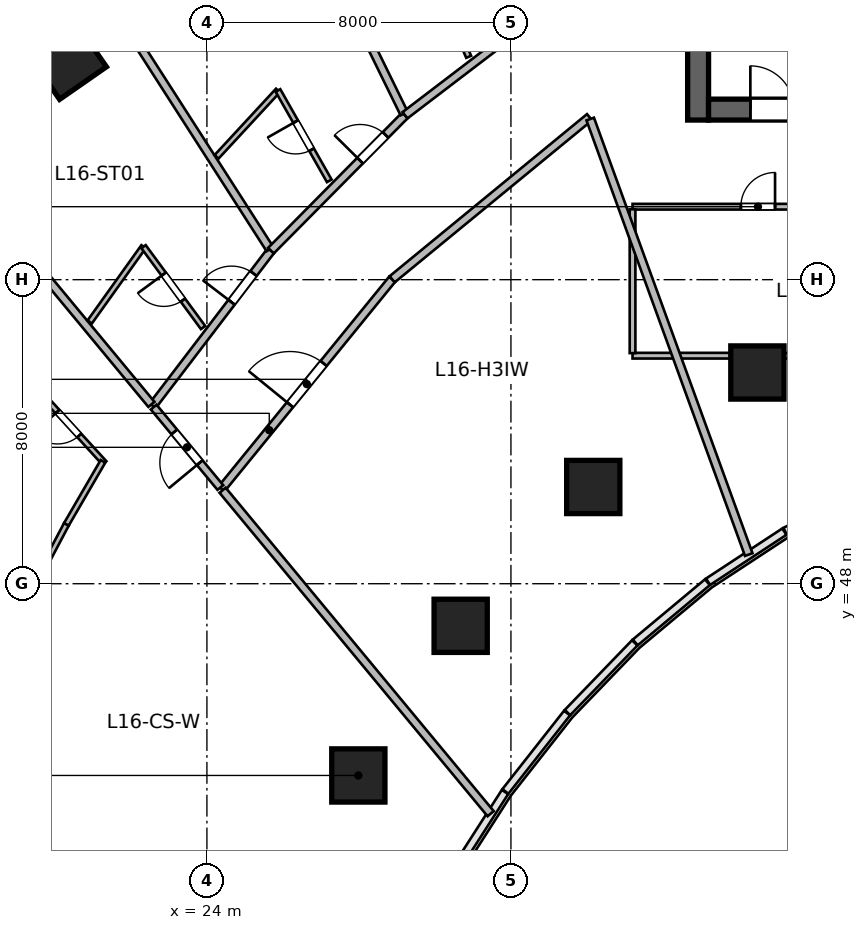
"""IFC4 building model, lengths in metres.
Left out: names, types, materials, properties, quantities, classifications, styles, units other than length and angle.
Written with IfcOpenShell. Run it as: python <this file> out.ifc"""

import sys

from ifc_helpers import new_model, si_unit, direction, frame, frame_2d, origin, origin_2d, place, context, subcontext, project, spatial, rectangle, circle, extrude, source, transform, mapped, element, fill, save


model = new_model("IFC4")
c1 = context("Model", 3, precision=1e-05, world=origin(), true_north=direction((0.0, 1.0)))
c2 = subcontext(c1, "Body", "Model", "MODEL_VIEW")
j1 = project(units=[si_unit("LENGTHUNIT", "METRE"), si_unit("PLANEANGLEUNIT", "RADIAN")], contexts=[c1])
p1 = place(None, origin())
s1 = spatial("IfcSite", under=j1, at=p1, CompositionType="ELEMENT")
p2 = place(p1, origin())
s2 = spatial("IfcBuilding", under=s1, at=p2, CompositionType="ELEMENT")
p3 = place(p2, frame((0.0, 0.0, 71.4)))
s3 = spatial("IfcBuildingStorey", under=s2, at=p3, CompositionType="ELEMENT", Elevation=71.4)
m1 = source(origin(), c2, "Body", "SweptSolid", [
    extrude(rectangle(XDim=12.0, YDim=0.55, at=frame_2d((6.0, 0.0))), origin(), (0.0, 0.0, 1.0), 3.6),
])
p4 = place(p3, frame((36.925, 60.2, 0.0), z_axis=(0.0, 0.0, 1.0), x_axis=(0.0, 1.0, 0.0)))
e1 = element("IfcWall", 1, at=p4, inside=s3, PredefinedType="SHEAR", context=c2, shape_type="MappedRepresentation", body=[
    mapped(m1, transform((0.0, 0.0, 0.0), scale=1.0)),
])
m2 = source(origin(), c2, "Body", "SweptSolid", [
    extrude(rectangle(XDim=21.6, YDim=0.55, at=frame_2d((10.8, 0.0))), origin(), (0.0, 0.0, 1.0), 3.6),
])
p5 = place(p3, frame((37.2, 60.475, 0.0), z_axis=(0.0, 0.0, 1.0), x_axis=(1.0, 0.0, 0.0)))
e2 = element("IfcWall", 2, at=p5, inside=s3, PredefinedType="SHEAR", context=c2, shape_type="MappedRepresentation", body=[
    mapped(m2, transform((0.0, 0.0, 0.0), scale=1.0)),
])
p6 = place(p5, frame((1.1, 0.0, 0.0)))
e3 = element("IfcOpeningElement", 3, at=p6, cuts=e2, PredefinedType="OPENING", context=c2, shape_type="SweptSolid", body=[
    extrude(rectangle(XDim=1.15, YDim=2.15, at=frame_2d((0.575, 1.075))), frame((0.0, 0.285, 0.0), z_axis=(0.0, -1.0, 0.0), x_axis=(1.0, 0.0, 0.0)), (0.0, 0.0, 1.0), 0.57),
])
p7 = place(p5, frame((19.5, 0.0, 0.0)))
e4 = element("IfcOpeningElement", 4, at=p7, cuts=e2, PredefinedType="OPENING", context=c2, shape_type="SweptSolid", body=[
    extrude(rectangle(XDim=0.9, YDim=2.1, at=frame_2d((0.45, 1.05))), frame((0.0, 0.285, 0.0), z_axis=(0.0, -1.0, 0.0), x_axis=(1.0, 0.0, 0.0)), (0.0, 0.0, 1.0), 0.57),
])
p8 = place(p5, frame((12.02, 0.0, 0.0)))
e5 = element("IfcOpeningElement", 5, at=p8, cuts=e2, PredefinedType="OPENING", context=c2, shape_type="SweptSolid", body=[
    extrude(rectangle(XDim=1.6, YDim=2.15, at=frame_2d((0.8, 1.075))), frame((0.0, 0.285, 0.0), z_axis=(0.0, -1.0, 0.0), x_axis=(1.0, 0.0, 0.0)), (0.0, 0.0, 1.0), 0.57),
])
m3 = source(origin(), c2, "Body", "SweptSolid", [
    extrude(circle(Radius=0.7, at=origin_2d()), origin(), (0.0, 0.0, 1.0), 3.6),
])
for number, where, z_axis, x_axis in (
    (6, (27.985, 42.955, 0.0), (0.0, 0.0, 1.0), (-0.691, 0.723, 0.0)),
    (7, (30.677, 46.892, 0.0), (0.0, 0.0, 1.0), (-0.571, 0.821, 0.0)),
):
    element("IfcColumn", number, at=place(p3, frame(where, z_axis=z_axis, x_axis=x_axis)), inside=s3, PredefinedType="COLUMN", context=c2, shape_type="MappedRepresentation", body=[
        mapped(m3, transform((0.0, 0.0, 0.0), scale=1.0)),
    ])
m4 = source(origin(), c2, "Body", "SweptSolid", [
    extrude(rectangle(XDim=1.5, YDim=1.5, at=origin_2d()), origin(), (0.0, 0.0, 1.0), 3.6),
])
p9 = place(p3, frame((20.311, 61.789, 0.0), z_axis=(0.0, 0.0, 1.0), x_axis=(-0.571143442153, 0.820850271661, 0.0)))
e8 = element("IfcColumn", 8, at=p9, inside=s3, PredefinedType="COLUMN", context=c2, shape_type="MappedRepresentation", body=[
    mapped(m4, transform((0.0, 0.0, 0.0), scale=1.0)),
])
for number, where, z_axis, x_axis in (
    (9, (34.166, 50.545, 0.0), (0.0, 0.0, 1.0), (-0.436, 0.9, 0.0)),
    (10, (38.485, 53.558, 0.0), (0.0, 0.0, 1.0), (-0.289, 0.957, 0.0)),
):
    element("IfcColumn", number, at=place(p3, frame(where, z_axis=z_axis, x_axis=x_axis)), inside=s3, PredefinedType="COLUMN", context=c2, shape_type="MappedRepresentation", body=[
        mapped(m3, transform((0.0, 0.0, 0.0), scale=1.0)),
    ])
m5 = source(origin(), c2, "Body", "SweptSolid", [
    extrude(rectangle(XDim=6.6, YDim=0.15, at=frame_2d((3.3, 0.0))), origin(), (0.0, 0.0, 1.0), 2.803),
])
p10 = place(p3, frame((35.2, 54.0, 0.0), z_axis=(0.0, 0.0, 1.0), x_axis=(1.0, 0.0, 0.0)))
e11 = element("IfcWall", 11, at=p10, inside=s3, PredefinedType="PARTITIONING", context=c2, shape_type="MappedRepresentation", body=[
    mapped(m5, transform((0.0, 0.0, 0.0), scale=1.0)),
])
m6 = source(origin(), c2, "Body", "SweptSolid", [
    extrude(rectangle(XDim=6.6, YDim=0.15, at=frame_2d((3.3, 0.0))), origin(), (0.0, 0.0, 1.0), 3.36),
])
p11 = place(p3, frame((35.2, 57.92, 0.0), z_axis=(0.0, 0.0, 1.0), x_axis=(1.0, 0.0, 0.0)))
e12 = element("IfcWall", 12, at=p11, inside=s3, PredefinedType="PARTITIONING", context=c2, shape_type="MappedRepresentation", body=[
    mapped(m6, transform((0.0, 0.0, 0.0), scale=1.0)),
])
p12 = place(p11, frame((2.85, 0.0, 0.0)))
e13 = element("IfcOpeningElement", 13, at=p12, cuts=e12, PredefinedType="OPENING", context=c2, shape_type="SweptSolid", body=[
    extrude(rectangle(XDim=0.9, YDim=2.1, at=frame_2d((0.45, 1.05))), frame((0.0, 0.085, 0.0), z_axis=(0.0, -1.0, 0.0), x_axis=(1.0, 0.0, 0.0)), (0.0, 0.0, 1.0), 0.17),
])
m7 = source(origin(), c2, "Body", "SweptSolid", [
    extrude(rectangle(XDim=3.785, YDim=0.15, at=frame_2d((1.893, 0.0))), origin(), (0.0, 0.0, 1.0), 3.36),
])
p13 = place(p3, frame((35.2, 54.067, 0.0), z_axis=(0.0, 0.0, 1.0), x_axis=(0.0, 1.0, 0.0)))
e14 = element("IfcWall", 14, at=p13, inside=s3, PredefinedType="PARTITIONING", context=c2, shape_type="MappedRepresentation", body=[
    mapped(m7, transform((0.0, 0.0, 0.0), scale=1.0)),
])
m8 = source(origin(), c2, "Body", "SweptSolid", [
    extrude(rectangle(XDim=7.113, YDim=0.21, at=frame_2d((3.556, 0.0))), origin(), (0.0, 0.0, 1.0), 3.36),
])
p14 = place(p3, frame((24.383, 50.495, 0.0), z_axis=(0.0, 0.0, 1.0), x_axis=(0.63149032532, 0.775383755974, 0.0)))
e15 = element("IfcWall", 15, at=p14, inside=s3, PredefinedType="PARTITIONING", context=c2, shape_type="MappedRepresentation", body=[
    mapped(m8, transform((0.0, 0.0, 0.0), scale=1.0)),
])
p15 = place(p14, frame((2.856, 0.0, 0.0)))
e16 = element("IfcOpeningElement", 16, at=p15, cuts=e15, PredefinedType="OPENING", context=c2, shape_type="SweptSolid", body=[
    extrude(rectangle(XDim=1.4, YDim=2.15, at=frame_2d((0.7, 1.075))), frame((0.0, 0.115, 0.0), z_axis=(0.0, -1.0, 0.0), x_axis=(1.0, 0.0, 0.0)), (0.0, 0.0, 1.0), 0.23),
])
m9 = source(origin(), c2, "Body", "SweptSolid", [
    extrude(rectangle(XDim=6.721, YDim=0.21, at=frame_2d((3.361, 0.0))), origin(), (0.0, 0.0, 1.0), 3.36),
])
p16 = place(p3, frame((28.874, 56.01, 0.0), z_axis=(0.0, 0.0, 1.0), x_axis=(0.772828051199, 0.63461547671, 0.0)))
e17 = element("IfcWall", 17, at=p16, inside=s3, PredefinedType="PARTITIONING", context=c2, shape_type="MappedRepresentation", body=[
    mapped(m9, transform((0.0, 0.0, 0.0), scale=1.0)),
])
m10 = source(origin(), c2, "Body", "SweptSolid", [
    extrude(rectangle(XDim=11.053, YDim=0.21, at=frame_2d((5.527, 0.0))), origin(), (0.0, 0.0, 1.0), 3.36),
])
p17 = place(p3, frame((31.466, 41.949, 0.0), z_axis=(0.0, 0.0, 1.0), x_axis=(-0.638131235571, 0.769927611005, 0.0)))
e18 = element("IfcWall", 18, at=p17, inside=s3, PredefinedType="PARTITIONING", context=c2, shape_type="MappedRepresentation", body=[
    mapped(m10, transform((0.0, 0.0, 0.0), scale=1.0)),
])
m11 = source(origin(), c2, "Body", "SweptSolid", [
    extrude(rectangle(XDim=12.196, YDim=0.21, at=frame_2d((6.098, 0.0))), origin(), (0.0, 0.0, 1.0), 3.36),
])
p18 = place(p3, frame((38.258, 48.766, 0.0), z_axis=(0.0, 0.0, 1.0), x_axis=(-0.342022711534, 0.939691686031, 0.0)))
e19 = element("IfcWall", 19, at=p18, inside=s3, PredefinedType="PARTITIONING", context=c2, shape_type="MappedRepresentation", body=[
    mapped(m11, transform((0.0, 0.0, 0.0), scale=1.0)),
])
m12 = source(origin(), c2, "Body", "SweptSolid", [
    extrude(rectangle(XDim=5.135, YDim=0.21, at=frame_2d((2.567, 0.0))), origin(), (0.0, 0.0, 1.0), 3.36),
])
p19 = place(p3, frame((22.57, 52.683, 0.0), z_axis=(0.0, 0.0, 1.0), x_axis=(0.606802199649, 0.794852873494, 0.0)))
e20 = element("IfcWall", 20, at=p19, inside=s3, PredefinedType="PARTITIONING", context=c2, shape_type="MappedRepresentation", body=[
    mapped(m12, transform((0.0, 0.0, 0.0), scale=1.0)),
])
p20 = place(p19, frame((3.427, 0.0, 0.0)))
e21 = element("IfcOpeningElement", 21, at=p20, cuts=e20, PredefinedType="OPENING", context=c2, shape_type="SweptSolid", body=[
    extrude(rectangle(XDim=0.95, YDim=2.15, at=frame_2d((0.475, 1.075))), frame((0.0, 0.115, 0.0), z_axis=(0.0, -1.0, 0.0), x_axis=(1.0, 0.0, 0.0)), (0.0, 0.0, 1.0), 0.23),
])
m13 = source(origin(), c2, "Body", "SweptSolid", [
    extrude(rectangle(XDim=10.975, YDim=0.21, at=frame_2d((5.487, 0.0))), origin(), (0.0, 0.0, 1.0), 3.36),
])
p21 = place(p3, frame((22.54, 52.719, 0.0), z_axis=(0.0, 0.0, 1.0), x_axis=(-0.638125265812, 0.769932558821, 0.0)))
e22 = element("IfcWall", 22, at=p21, inside=s3, PredefinedType="PARTITIONING", context=c2, shape_type="MappedRepresentation", body=[
    mapped(m13, transform((0.0, 0.0, 0.0), scale=1.0)),
])
m14 = source(origin(), c2, "Body", "SweptSolid", [
    extrude(rectangle(XDim=11.432, YDim=0.21, at=frame_2d((5.716, 0.0))), origin(), (0.0, 0.0, 1.0), 3.36),
])
p22 = place(p3, frame((25.659, 56.805, 0.0), z_axis=(0.0, 0.0, 1.0), x_axis=(-0.540196183124, 0.841539115988, 0.0)))
e23 = element("IfcWall", 23, at=p22, inside=s3, PredefinedType="PARTITIONING", context=c2, shape_type="MappedRepresentation", body=[
    mapped(m14, transform((0.0, 0.0, 0.0), scale=1.0)),
])
m15 = source(origin(), c2, "Body", "SweptSolid", [
    extrude(rectangle(XDim=2.437, YDim=0.14, at=frame_2d((1.218, 0.0))), origin(), (0.0, 0.0, 1.0), 3.36),
])
p23 = place(p3, frame((20.915, 54.886, 0.0), z_axis=(0.0, 0.0, 1.0), x_axis=(0.581797219134, 0.813333877204, 0.0)))
e24 = element("IfcWall", 24, at=p23, inside=s3, PredefinedType="PARTITIONING", context=c2, shape_type="MappedRepresentation", body=[
    mapped(m15, transform((0.0, 0.0, 0.0), scale=1.0)),
])
m16 = source(origin(), c2, "Body", "SweptSolid", [
    extrude(rectangle(XDim=2.642, YDim=0.14, at=frame_2d((1.321, 0.0))), origin(), (0.0, 0.0, 1.0), 3.36),
])
p24 = place(p3, frame((23.899, 54.741, 0.0), z_axis=(0.0, 0.0, 1.0), x_axis=(-0.592789122423, 0.805357719487, 0.0)))
e25 = element("IfcWall", 25, at=p24, inside=s3, PredefinedType="PARTITIONING", context=c2, shape_type="MappedRepresentation", body=[
    mapped(m16, transform((0.0, 0.0, 0.0), scale=1.0)),
])
p25 = place(p24, frame((0.896, 0.0, 0.0)))
e26 = element("IfcOpeningElement", 26, at=p25, cuts=e25, PredefinedType="OPENING", context=c2, shape_type="SweptSolid", body=[
    extrude(rectangle(XDim=0.85, YDim=2.05, at=frame_2d((0.425, 1.025))), frame((0.0, 0.08, 0.0), z_axis=(0.0, -1.0, 0.0), x_axis=(1.0, 0.0, 0.0)), (0.0, 0.0, 1.0), 0.16),
])
m17 = source(origin(), c2, "Body", "SweptSolid", [
    extrude(rectangle(XDim=5.012, YDim=0.21, at=frame_2d((2.506, 0.0))), origin(), (0.0, 0.0, 1.0), 3.36),
])
p26 = place(p3, frame((25.685, 56.764, 0.0), z_axis=(0.0, 0.0, 1.0), x_axis=(0.703664626435, 0.710532260707, 0.0)))
e27 = element("IfcWall", 27, at=p26, inside=s3, PredefinedType="PARTITIONING", context=c2, shape_type="MappedRepresentation", body=[
    mapped(m17, transform((0.0, 0.0, 0.0), scale=1.0)),
])
p27 = place(p26, frame((3.335, 0.0, 0.0)))
e28 = element("IfcOpeningElement", 28, at=p27, cuts=e27, PredefinedType="OPENING", context=c2, shape_type="SweptSolid", body=[
    extrude(rectangle(XDim=0.95, YDim=2.15, at=frame_2d((0.475, 1.075))), frame((0.0, 0.115, 0.0), z_axis=(0.0, -1.0, 0.0), x_axis=(1.0, 0.0, 0.0)), (0.0, 0.0, 1.0), 0.23),
])
m18 = source(origin(), c2, "Body", "SweptSolid", [
    extrude(rectangle(XDim=11.775, YDim=0.21, at=frame_2d((5.887, 0.0))), origin(), (0.0, 0.0, 1.0), 2.644),
])
p28 = place(p3, frame((29.19, 60.371, 0.0), z_axis=(0.0, 0.0, 1.0), x_axis=(-0.4401500056, 0.897924257702, 0.0)))
e29 = element("IfcWall", 29, at=p28, inside=s3, PredefinedType="PARTITIONING", context=c2, shape_type="MappedRepresentation", body=[
    mapped(m18, transform((0.0, 0.0, 0.0), scale=1.0)),
])
m19 = source(origin(), c2, "Body", "SweptSolid", [
    extrude(rectangle(XDim=2.38, YDim=0.14, at=frame_2d((1.19, 0.0))), origin(), (0.0, 0.0, 1.0), 3.36),
])
p29 = place(p3, frame((24.253, 59.231, 0.0), z_axis=(0.0, 0.0, 1.0), x_axis=(0.679084816758, 0.734059814762, 0.0)))
e30 = element("IfcWall", 30, at=p29, inside=s3, PredefinedType="PARTITIONING", context=c2, shape_type="MappedRepresentation", body=[
    mapped(m19, transform((0.0, 0.0, 0.0), scale=1.0)),
])
m20 = source(origin(), c2, "Body", "SweptSolid", [
    extrude(rectangle(XDim=2.735, YDim=0.14, at=frame_2d((1.367, 0.0))), origin(), (0.0, 0.0, 1.0), 3.36),
])
p30 = place(p3, frame((27.219, 58.6, 0.0), z_axis=(0.0, 0.0, 1.0), x_axis=(-0.493694940578, 0.869635156631, 0.0)))
e31 = element("IfcWall", 31, at=p30, inside=s3, PredefinedType="PARTITIONING", context=c2, shape_type="MappedRepresentation", body=[
    mapped(m20, transform((0.0, 0.0, 0.0), scale=1.0)),
])
p31 = place(p30, frame((0.942, 0.0, 0.0)))
e32 = element("IfcOpeningElement", 32, at=p31, cuts=e31, PredefinedType="OPENING", context=c2, shape_type="SweptSolid", body=[
    extrude(rectangle(XDim=0.85, YDim=2.05, at=frame_2d((0.425, 1.025))), frame((0.0, 0.08, 0.0), z_axis=(0.0, -1.0, 0.0), x_axis=(1.0, 0.0, 0.0)), (0.0, 0.0, 1.0), 0.16),
])
m21 = source(origin(), c2, "Body", "SweptSolid", [
    extrude(rectangle(XDim=4.762, YDim=0.21, at=frame_2d((2.381, 0.0))), origin(), (0.0, 0.0, 1.0), 3.36),
])
p32 = place(p3, frame((29.212, 60.326, 0.0), z_axis=(0.0, 0.0, 1.0), x_axis=(0.795070295872, 0.60651729128, 0.0)))
e33 = element("IfcWall", 33, at=p32, inside=s3, PredefinedType="PARTITIONING", context=c2, shape_type="MappedRepresentation", body=[
    mapped(m21, transform((0.0, 0.0, 0.0), scale=1.0)),
])
p33 = place(p32, frame((3.144, 0.0, 0.0)))
e34 = element("IfcOpeningElement", 34, at=p33, cuts=e33, PredefinedType="OPENING", context=c2, shape_type="SweptSolid", body=[
    extrude(rectangle(XDim=0.95, YDim=2.15, at=frame_2d((0.475, 1.075))), frame((0.0, 0.115, 0.0), z_axis=(0.0, -1.0, 0.0), x_axis=(1.0, 0.0, 0.0)), (0.0, 0.0, 1.0), 0.23),
])
m22 = source(origin(), c2, "Body", "SweptSolid", [
    extrude(rectangle(XDim=2.819, YDim=0.14, at=frame_2d((1.409, 0.0))), origin(), (0.0, 0.0, 1.0), 3.36),
])
p34 = place(p3, frame((30.888, 61.864, 0.0), z_axis=(0.0, 0.0, 1.0), x_axis=(-0.394420979357, 0.918929861874, 0.0)))
e35 = element("IfcWall", 35, at=p34, inside=s3, PredefinedType="PARTITIONING", context=c2, shape_type="MappedRepresentation", body=[
    mapped(m22, transform((0.0, 0.0, 0.0), scale=1.0)),
])
p35 = place(p34, frame((0.984, 0.0, 0.0)))
e36 = element("IfcOpeningElement", 36, at=p35, cuts=e35, PredefinedType="OPENING", context=c2, shape_type="SweptSolid", body=[
    extrude(rectangle(XDim=0.85, YDim=2.05, at=frame_2d((0.425, 1.025))), frame((0.0, 0.08, 0.0), z_axis=(0.0, -1.0, 0.0), x_axis=(1.0, 0.0, 0.0)), (0.0, 0.0, 1.0), 0.16),
])
m23 = source(origin(), c2, "Body", "SweptSolid", [
    extrude(rectangle(XDim=2.748, YDim=0.195, at=frame_2d((1.374, 0.0))), origin(), (0.0, 0.0, 1.0), 3.36),
])
p36 = place(p3, frame((24.353, 50.531, 0.0), z_axis=(0.0, 0.0, 1.0), x_axis=(-0.638111168284, 0.769944242729, 0.0)))
e37 = element("IfcWall", 37, at=p36, inside=s3, PredefinedType="PARTITIONING", context=c2, shape_type="MappedRepresentation", body=[
    mapped(m23, transform((0.0, 0.0, 0.0), scale=1.0)),
])
p37 = place(p36, frame((0.849, 0.0, 0.0)))
e38 = element("IfcOpeningElement", 38, at=p37, cuts=e37, PredefinedType="OPENING", context=c2, shape_type="SweptSolid", body=[
    extrude(rectangle(XDim=1.05, YDim=2.15, at=frame_2d((0.525, 1.075))), frame((0.0, 0.107, 0.0), z_axis=(0.0, -1.0, 0.0), x_axis=(1.0, 0.0, 0.0)), (0.0, 0.0, 1.0), 0.215),
])
m24 = source(origin(), c2, "Body", "SweptSolid", [
    extrude(rectangle(XDim=2.812, YDim=0.14, at=frame_2d((1.406, 0.0))), origin(), (0.0, 0.0, 1.0), 3.36),
])
p38 = place(p3, frame((21.303, 51.177, 0.0), z_axis=(0.0, 0.0, 1.0), x_axis=(-0.675119025852, 0.737708818527, 0.0)))
e39 = element("IfcWall", 39, at=p38, inside=s3, PredefinedType="PARTITIONING", context=c2, shape_type="MappedRepresentation", body=[
    mapped(m24, transform((0.0, 0.0, 0.0), scale=1.0)),
])
p39 = place(p38, frame((0.981, 0.0, 0.0)))
e40 = element("IfcOpeningElement", 40, at=p39, cuts=e39, PredefinedType="OPENING", context=c2, shape_type="SweptSolid", body=[
    extrude(rectangle(XDim=0.85, YDim=2.05, at=frame_2d((0.425, 1.025))), frame((0.0, 0.08, 0.0), z_axis=(0.0, -1.0, 0.0), x_axis=(1.0, 0.0, 0.0)), (0.0, 0.0, 1.0), 0.16),
])
m25 = source(origin(), c2, "Body", "SweptSolid", [
    extrude(rectangle(XDim=1.936, YDim=0.14, at=frame_2d((0.968, 0.0))), origin(), (0.0, 0.0, 1.0), 3.36),
])
p40 = place(p3, frame((19.398, 47.852, 0.0), z_axis=(0.0, 0.0, 1.0), x_axis=(0.467174971862, 0.884164886017, 0.0)))
e41 = element("IfcWall", 41, at=p40, inside=s3, PredefinedType="PARTITIONING", context=c2, shape_type="MappedRepresentation", body=[
    mapped(m25, transform((0.0, 0.0, 0.0), scale=1.0)),
])
m26 = source(origin(), c2, "Body", "SweptSolid", [
    extrude(rectangle(XDim=1.914, YDim=0.14, at=frame_2d((0.957, 0.0))), origin(), (0.0, 0.0, 1.0), 3.36),
])
p41 = place(p3, frame((20.303, 49.563, 0.0), z_axis=(0.0, 0.0, 1.0), x_axis=(0.502347790612, 0.864665656347, 0.0)))
e42 = element("IfcWall", 42, at=p41, inside=s3, PredefinedType="PARTITIONING", context=c2, shape_type="MappedRepresentation", body=[
    mapped(m26, transform((0.0, 0.0, 0.0), scale=1.0)),
])
m27 = source(origin(), c2, "Body", "SweptSolid", [
    extrude(rectangle(XDim=1.15, YDim=2.15, at=frame_2d((0.575, 1.075))), frame((0.0, 0.025, 0.0), z_axis=(0.0, -1.0, 0.0), x_axis=(1.0, 0.0, 0.0)), (0.0, 0.0, 1.0), 0.05),
])
p42 = place(p6, origin())
e43 = element("IfcDoor", 43, at=p42, inside=s3, OperationType="SINGLE_SWING_LEFT", PredefinedType="DOOR", context=c2, shape_type="MappedRepresentation", body=[
    mapped(m27, transform((0.0, 0.0, 0.0), scale=1.0)),
])
fill(e3, e43)
m28 = source(origin(), c2, "Body", "SweptSolid", [
    extrude(rectangle(XDim=0.9, YDim=2.1, at=frame_2d((0.45, 1.05))), frame((0.0, 0.025, 0.0), z_axis=(0.0, -1.0, 0.0), x_axis=(1.0, 0.0, 0.0)), (0.0, 0.0, 1.0), 0.05),
])
p43 = place(p12, origin())
e44 = element("IfcDoor", 44, at=p43, inside=s3, OperationType="SINGLE_SWING_RIGHT", PredefinedType="DOOR", context=c2, shape_type="MappedRepresentation", body=[
    mapped(m28, transform((0.0, 0.0, 0.0), scale=1.0)),
])
fill(e13, e44)
m29 = source(origin(), c2, "Body", "SweptSolid", [
    extrude(rectangle(XDim=1.4, YDim=2.15, at=frame_2d((0.7, 1.075))), frame((0.0, 0.025, 0.0), z_axis=(0.0, -1.0, 0.0), x_axis=(1.0, 0.0, 0.0)), (0.0, 0.0, 1.0), 0.05),
])
p44 = place(p15, origin())
e45 = element("IfcDoor", 45, at=p44, inside=s3, OperationType="SINGLE_SWING_LEFT", PredefinedType="DOOR", context=c2, shape_type="MappedRepresentation", body=[
    mapped(m29, transform((0.0, 0.0, 0.0), scale=1.0)),
])
fill(e16, e45)
m30 = source(origin(), c2, "Body", "SweptSolid", [
    extrude(rectangle(XDim=0.95, YDim=2.15, at=frame_2d((0.475, 1.075))), frame((0.0, 0.025, 0.0), z_axis=(0.0, -1.0, 0.0), x_axis=(1.0, 0.0, 0.0)), (0.0, 0.0, 1.0), 0.05),
])
p45 = place(p20, origin())
e46 = element("IfcDoor", 46, at=p45, inside=s3, OperationType="SINGLE_SWING_LEFT", PredefinedType="DOOR", context=c2, shape_type="MappedRepresentation", body=[
    mapped(m30, transform((0.0, 0.0, 0.0), scale=1.0)),
])
fill(e21, e46)
m31 = source(origin(), c2, "Body", "SweptSolid", [
    extrude(rectangle(XDim=0.85, YDim=2.05, at=frame_2d((0.425, 1.025))), frame((0.0, 0.025, 0.0), z_axis=(0.0, -1.0, 0.0), x_axis=(1.0, 0.0, 0.0)), (0.0, 0.0, 1.0), 0.05),
])
p46 = place(p25, origin())
e47 = element("IfcDoor", 47, at=p46, inside=s3, OperationType="SINGLE_SWING_RIGHT", PredefinedType="DOOR", context=c2, shape_type="MappedRepresentation", body=[
    mapped(m31, transform((0.0, 0.0, 0.0), scale=1.0)),
])
fill(e26, e47)
p47 = place(p27, origin())
e48 = element("IfcDoor", 48, at=p47, inside=s3, OperationType="SINGLE_SWING_LEFT", PredefinedType="DOOR", context=c2, shape_type="MappedRepresentation", body=[
    mapped(m30, transform((0.0, 0.0, 0.0), scale=1.0)),
])
fill(e28, e48)
p48 = place(p31, origin())
e49 = element("IfcDoor", 49, at=p48, inside=s3, OperationType="SINGLE_SWING_RIGHT", PredefinedType="DOOR", context=c2, shape_type="MappedRepresentation", body=[
    mapped(m31, transform((0.0, 0.0, 0.0), scale=1.0)),
])
fill(e32, e49)
m32 = source(origin(), c2, "Body", "SweptSolid", [
    extrude(rectangle(XDim=1.05, YDim=2.15, at=frame_2d((0.525, 1.075))), frame((0.0, 0.025, 0.0), z_axis=(0.0, -1.0, 0.0), x_axis=(1.0, 0.0, 0.0)), (0.0, 0.0, 1.0), 0.05),
])
p49 = place(p37, origin())
e50 = element("IfcDoor", 50, at=p49, inside=s3, OperationType="SINGLE_SWING_LEFT", PredefinedType="DOOR", context=c2, shape_type="MappedRepresentation", body=[
    mapped(m32, transform((0.0, 0.0, 0.0), scale=1.0)),
])
fill(e38, e50)
p50 = place(p39, origin())
e51 = element("IfcDoor", 51, at=p50, inside=s3, OperationType="SINGLE_SWING_RIGHT", PredefinedType="DOOR", context=c2, shape_type="MappedRepresentation", body=[
    mapped(m31, transform((0.0, 0.0, 0.0), scale=1.0)),
])
fill(e40, e51)
save(model, sys.argv[1])
